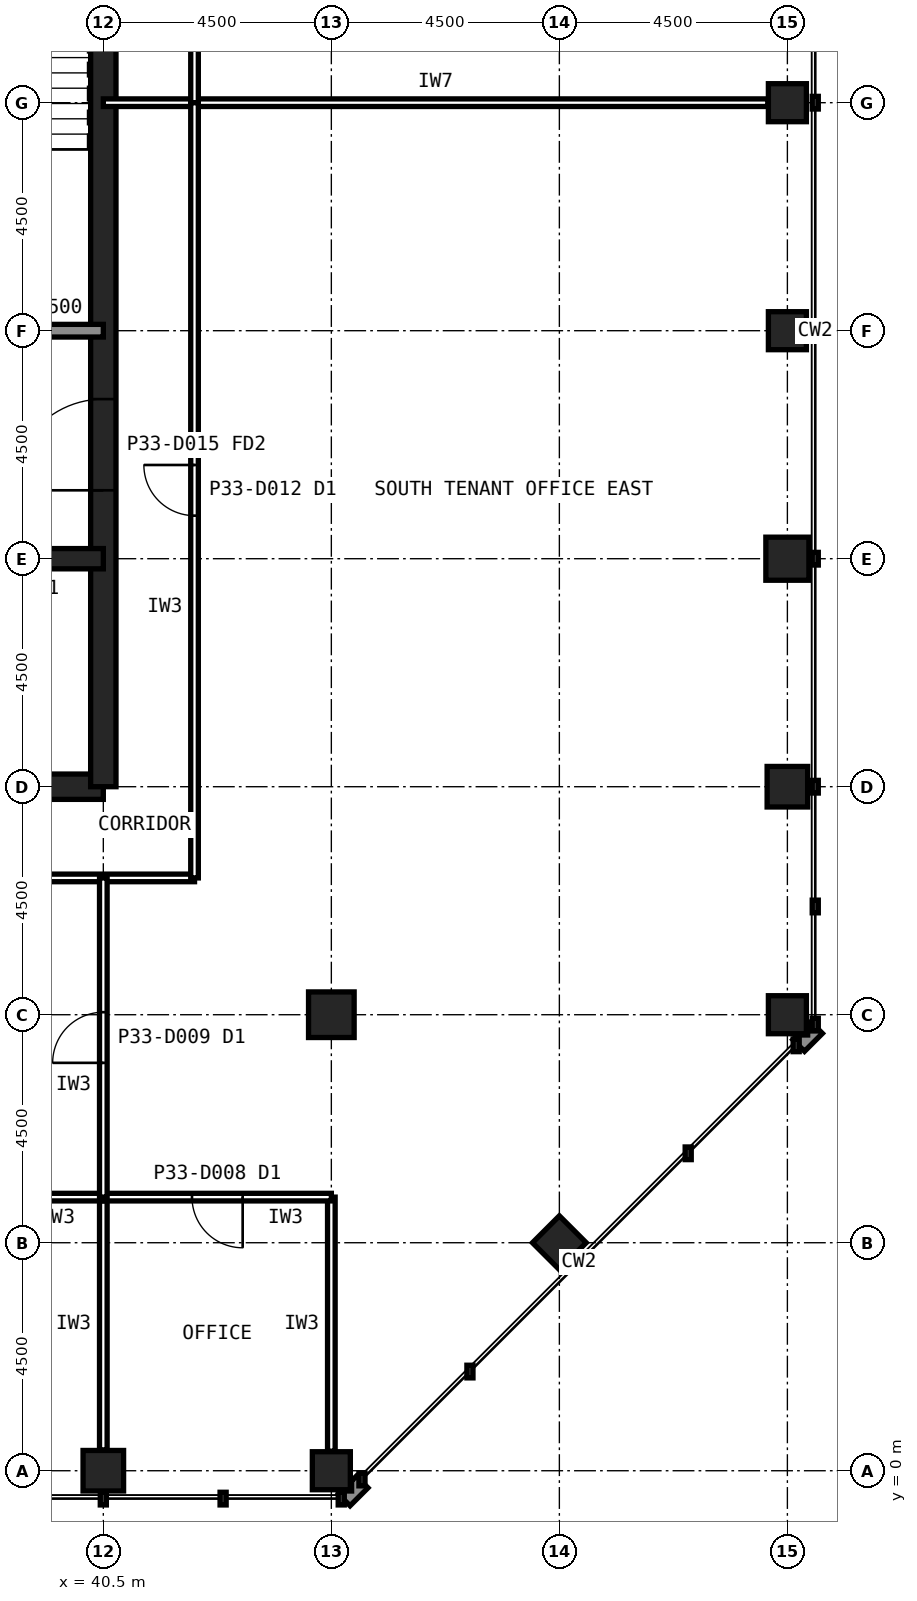
"""IFC4 building model, lengths in metres.
Left out: names, types, materials, properties, quantities, classifications, styles, units other than length and angle.
Written with IfcOpenShell. Run it as: python <this file> out.ifc"""

import sys

from ifc_helpers import new_model, si_unit, direction, frame, frame_2d, origin, origin_2d, place, context, subcontext, project, spatial, rectangle, hollow_rectangle, extrude, element, fill, save


model = new_model("IFC4")
c1 = context("Model", 3, precision=1e-05, world=origin(), true_north=direction((0.0, 1.0)))
c2 = subcontext(c1, "Body", "Model", "MODEL_VIEW")
j1 = project(units=[si_unit("LENGTHUNIT", "METRE"), si_unit("PLANEANGLEUNIT", "RADIAN")], contexts=[c1])
p1 = place(None, origin())
s1 = spatial("IfcSite", under=j1, at=p1, CompositionType="ELEMENT")
p2 = place(p1, origin())
s2 = spatial("IfcBuilding", under=s1, at=p2, CompositionType="ELEMENT")
p3 = place(p2, frame((0.0, 0.0, 143.6)))
s3 = spatial("IfcBuildingStorey", under=s2, at=p3, CompositionType="ELEMENT", Elevation=143.6)
p4 = place(p3, frame((40.5, 0.0, 0.0), z_axis=(0.0, 0.0, 1.0), x_axis=(1.0, 0.0, 0.0)))
e1 = element("IfcColumn", 1, at=p4, inside=s3, PredefinedType="COLUMN", context=c2, shape_type="SweptSolid", body=[
    extrude(hollow_rectangle(XDim=0.8, YDim=0.8, WallThickness=0.045, at=origin_2d()), origin(), (0.0, 0.0, 1.0), 4.0),
])
for number, where, z_axis, x_axis in (
    (2, (45.0, 0.0, 0.0), (0.0, 0.0, 1.0), (1.0, 0.0, 0.0)),
    (3, (54.0, 9.0, 0.0), (0.0, 0.0, 1.0), (1.0, 0.0, 0.0)),
):
    element("IfcColumn", number, at=place(p3, frame(where, z_axis=z_axis, x_axis=x_axis)), inside=s3, PredefinedType="COLUMN", context=c2, shape_type="SweptSolid", body=[
        extrude(hollow_rectangle(XDim=0.75, YDim=0.75, WallThickness=0.04, at=origin_2d()), origin(), (0.0, 0.0, 1.0), 4.0),
    ])
p5 = place(p3, frame((54.0, 13.5, 0.0), z_axis=(0.0, 0.0, 1.0), x_axis=(1.0, 0.0, 0.0)))
e4 = element("IfcColumn", 4, at=p5, inside=s3, PredefinedType="COLUMN", context=c2, shape_type="SweptSolid", body=[
    extrude(hollow_rectangle(XDim=0.8, YDim=0.8, WallThickness=0.045, at=origin_2d()), origin(), (0.0, 0.0, 1.0), 4.0),
])
p6 = place(p3, frame((54.0, 18.0, 0.0), z_axis=(0.0, 0.0, 1.0), x_axis=(1.0, 0.0, 0.0)))
e5 = element("IfcColumn", 5, at=p6, inside=s3, PredefinedType="COLUMN", context=c2, shape_type="SweptSolid", body=[
    extrude(hollow_rectangle(XDim=0.85, YDim=0.85, WallThickness=0.05, at=origin_2d()), origin(), (0.0, 0.0, 1.0), 4.0),
])
for number, where, z_axis, x_axis in (
    (6, (54.0, 22.5, 0.0), (0.0, 0.0, 1.0), (1.0, 0.0, 0.0)),
    (7, (54.0, 27.0, 0.0), (0.0, 0.0, 1.0), (1.0, 0.0, 0.0)),
    (8, (49.5, 4.5, 0.0), (0.0, 0.0, 1.0), (0.707, 0.707, 0.0)),
):
    element("IfcColumn", number, at=place(p3, frame(where, z_axis=z_axis, x_axis=x_axis)), inside=s3, PredefinedType="COLUMN", context=c2, shape_type="SweptSolid", body=[
        extrude(hollow_rectangle(XDim=0.75, YDim=0.75, WallThickness=0.04, at=origin_2d()), origin(), (0.0, 0.0, 1.0), 4.0),
    ])
p7 = place(p3, frame((45.0, 9.0, 0.0), z_axis=(0.0, 0.0, 1.0), x_axis=(1.0, 0.0, 0.0)))
e9 = element("IfcColumn", 9, at=p7, inside=s3, PredefinedType="COLUMN", context=c2, shape_type="SweptSolid", body=[
    extrude(hollow_rectangle(XDim=0.9, YDim=0.9, WallThickness=0.063, at=origin_2d()), origin(), (0.0, 0.0, 1.0), 4.0),
])
p8 = place(p3, frame((13.5, 13.5, 0.0), z_axis=(0.0, 0.0, 1.0), x_axis=(1.0, 0.0, 0.0)))
e10 = element("IfcWall", 10, at=p8, inside=s3, PredefinedType="SHEAR", context=c2, shape_type="SweptSolid", body=[
    extrude(rectangle(XDim=27.0, YDim=0.5, at=frame_2d((13.5, 0.0))), origin(), (0.0, 0.0, 1.0), 4.0),
])
p9 = place(p3, frame((40.5, 13.5, 0.0), z_axis=(0.0, 0.0, 1.0), x_axis=(0.0, 1.0, 0.0)))
e11 = element("IfcWall", 11, at=p9, inside=s3, PredefinedType="SHEAR", context=c2, shape_type="SweptSolid", body=[
    extrude(rectangle(XDim=27.0, YDim=0.5, at=frame_2d((13.5, 0.0))), origin(), (0.0, 0.0, 1.0), 4.0),
])
p10 = place(p9, frame((5.85, 0.0, 0.0)))
e12 = element("IfcOpeningElement", 12, at=p10, cuts=e11, PredefinedType="OPENING", context=c2, shape_type="SweptSolid", body=[
    extrude(rectangle(XDim=1.8, YDim=2.1, at=frame_2d((0.9, 1.05))), frame((0.0, 0.26, 0.0), z_axis=(0.0, -1.0, 0.0), x_axis=(1.0, 0.0, 0.0)), (0.0, 0.0, 1.0), 0.52),
])
p11 = place(p9, frame((19.65, 0.0, 0.0)))
e13 = element("IfcOpeningElement", 13, at=p11, cuts=e11, PredefinedType="OPENING", context=c2, shape_type="SweptSolid", body=[
    extrude(rectangle(XDim=1.2, YDim=2.1, at=frame_2d((0.6, 1.05))), frame((0.0, 0.26, 0.0), z_axis=(0.0, -1.0, 0.0), x_axis=(1.0, 0.0, 0.0)), (0.0, 0.0, 1.0), 0.52),
])
p12 = place(p3, frame((13.5, 18.0, 0.0), z_axis=(0.0, 0.0, 1.0), x_axis=(1.0, 0.0, 0.0)))
e14 = element("IfcWall", 14, at=p12, inside=s3, PredefinedType="SHEAR", context=c2, shape_type="SweptSolid", body=[
    extrude(rectangle(XDim=27.0, YDim=0.4, at=frame_2d((13.5, 0.0))), origin(), (0.0, 0.0, 1.0), 4.0),
])
p13 = place(p12, frame((24.3, 0.0, 0.0)))
e15 = element("IfcOpeningElement", 15, at=p13, cuts=e14, PredefinedType="OPENING", context=c2, shape_type="SweptSolid", body=[
    extrude(rectangle(XDim=0.9, YDim=2.1, at=frame_2d((0.45, 1.05))), frame((0.0, 0.21, 0.0), z_axis=(0.0, -1.0, 0.0), x_axis=(1.0, 0.0, 0.0)), (0.0, 0.0, 1.0), 0.42),
])
p14 = place(p12, frame((5.45, 0.0, 0.0)))
e16 = element("IfcOpeningElement", 16, at=p14, cuts=e14, PredefinedType="OPENING", context=c2, shape_type="SweptSolid", body=[
    extrude(rectangle(XDim=1.1, YDim=2.1, at=frame_2d((0.55, 1.05))), frame((0.0, 0.21, 0.0), z_axis=(0.0, -1.0, 0.0), x_axis=(1.0, 0.0, 0.0)), (0.0, 0.0, 1.0), 0.42),
])
p15 = place(p12, frame((8.45, 0.0, 0.0)))
e17 = element("IfcOpeningElement", 17, at=p15, cuts=e14, PredefinedType="OPENING", context=c2, shape_type="SweptSolid", body=[
    extrude(rectangle(XDim=1.1, YDim=2.1, at=frame_2d((0.55, 1.05))), frame((0.0, 0.21, 0.0), z_axis=(0.0, -1.0, 0.0), x_axis=(1.0, 0.0, 0.0)), (0.0, 0.0, 1.0), 0.42),
])
p16 = place(p12, frame((11.45, 0.0, 0.0)))
e18 = element("IfcOpeningElement", 18, at=p16, cuts=e14, PredefinedType="OPENING", context=c2, shape_type="SweptSolid", body=[
    extrude(rectangle(XDim=1.1, YDim=2.1, at=frame_2d((0.55, 1.05))), frame((0.0, 0.21, 0.0), z_axis=(0.0, -1.0, 0.0), x_axis=(1.0, 0.0, 0.0)), (0.0, 0.0, 1.0), 0.42),
])
p17 = place(p12, frame((14.45, 0.0, 0.0)))
e19 = element("IfcOpeningElement", 19, at=p17, cuts=e14, PredefinedType="OPENING", context=c2, shape_type="SweptSolid", body=[
    extrude(rectangle(XDim=1.1, YDim=2.1, at=frame_2d((0.55, 1.05))), frame((0.0, 0.21, 0.0), z_axis=(0.0, -1.0, 0.0), x_axis=(1.0, 0.0, 0.0)), (0.0, 0.0, 1.0), 0.42),
])
p18 = place(p12, frame((17.45, 0.0, 0.0)))
e20 = element("IfcOpeningElement", 20, at=p18, cuts=e14, PredefinedType="OPENING", context=c2, shape_type="SweptSolid", body=[
    extrude(rectangle(XDim=1.1, YDim=2.1, at=frame_2d((0.55, 1.05))), frame((0.0, 0.21, 0.0), z_axis=(0.0, -1.0, 0.0), x_axis=(1.0, 0.0, 0.0)), (0.0, 0.0, 1.0), 0.42),
])
p19 = place(p12, frame((20.45, 0.0, 0.0)))
e21 = element("IfcOpeningElement", 21, at=p19, cuts=e14, PredefinedType="OPENING", context=c2, shape_type="SweptSolid", body=[
    extrude(rectangle(XDim=1.1, YDim=2.1, at=frame_2d((0.55, 1.05))), frame((0.0, 0.21, 0.0), z_axis=(0.0, -1.0, 0.0), x_axis=(1.0, 0.0, 0.0)), (0.0, 0.0, 1.0), 0.42),
])
p20 = place(p12, frame((1.6, 0.0, 0.0)))
e22 = element("IfcOpeningElement", 22, at=p20, cuts=e14, PredefinedType="OPENING", context=c2, shape_type="SweptSolid", body=[
    extrude(rectangle(XDim=1.3, YDim=2.2, at=frame_2d((0.65, 1.1))), frame((0.0, 0.21, 0.0), z_axis=(0.0, -1.0, 0.0), x_axis=(1.0, 0.0, 0.0)), (0.0, 0.0, 1.0), 0.42),
])
p21 = place(p3, frame((13.5, 22.5, 0.0), z_axis=(0.0, 0.0, 1.0), x_axis=(1.0, 0.0, 0.0)))
e23 = element("IfcWall", 23, at=p21, inside=s3, PredefinedType="SOLIDWALL", context=c2, shape_type="SweptSolid", body=[
    extrude(rectangle(XDim=27.0, YDim=0.25, at=frame_2d((13.5, 0.0))), origin(), (0.0, 0.0, 1.0), 3.84),
])
p22 = place(p21, frame((1.65, 0.0, 0.0)))
e24 = element("IfcOpeningElement", 24, at=p22, cuts=e23, PredefinedType="OPENING", context=c2, shape_type="SweptSolid", body=[
    extrude(rectangle(XDim=1.2, YDim=2.1, at=frame_2d((0.6, 1.05))), frame((0.0, 0.135, 0.0), z_axis=(0.0, -1.0, 0.0), x_axis=(1.0, 0.0, 0.0)), (0.0, 0.0, 1.0), 0.27),
])
p23 = place(p21, frame((6.025, 0.0, 0.0)))
e25 = element("IfcOpeningElement", 25, at=p23, cuts=e23, PredefinedType="OPENING", context=c2, shape_type="SweptSolid", body=[
    extrude(rectangle(XDim=1.0, YDim=2.1, at=frame_2d((0.5, 1.05))), frame((0.0, 0.135, 0.0), z_axis=(0.0, -1.0, 0.0), x_axis=(1.0, 0.0, 0.0)), (0.0, 0.0, 1.0), 0.27),
])
p24 = place(p21, frame((10.525, 0.0, 0.0)))
e26 = element("IfcOpeningElement", 26, at=p24, cuts=e23, PredefinedType="OPENING", context=c2, shape_type="SweptSolid", body=[
    extrude(rectangle(XDim=1.0, YDim=2.1, at=frame_2d((0.5, 1.05))), frame((0.0, 0.135, 0.0), z_axis=(0.0, -1.0, 0.0), x_axis=(1.0, 0.0, 0.0)), (0.0, 0.0, 1.0), 0.27),
])
p25 = place(p21, frame((19.75, 0.0, 0.0)))
e27 = element("IfcOpeningElement", 27, at=p25, cuts=e23, PredefinedType="OPENING", context=c2, shape_type="SweptSolid", body=[
    extrude(rectangle(XDim=1.0, YDim=2.1, at=frame_2d((0.5, 1.05))), frame((0.0, 0.135, 0.0), z_axis=(0.0, -1.0, 0.0), x_axis=(1.0, 0.0, 0.0)), (0.0, 0.0, 1.0), 0.27),
])
p26 = place(p21, frame((15.05, 0.0, 0.0)))
e28 = element("IfcOpeningElement", 28, at=p26, cuts=e23, PredefinedType="OPENING", context=c2, shape_type="SweptSolid", body=[
    extrude(rectangle(XDim=1.4, YDim=2.4, at=frame_2d((0.7, 1.2))), frame((0.0, 0.135, 0.0), z_axis=(0.0, -1.0, 0.0), x_axis=(1.0, 0.0, 0.0)), (0.0, 0.0, 1.0), 0.27),
])
p27 = place(p3, frame((40.5, 27.0, 0.0), z_axis=(0.0, 0.0, 1.0), x_axis=(1.0, 0.0, 0.0)))
e29 = element("IfcWall", 29, at=p27, inside=s3, PredefinedType="PARTITIONING", context=c2, shape_type="SweptSolid", body=[
    extrude(rectangle(XDim=13.115, YDim=0.15, at=frame_2d((6.558, 0.0))), origin(), (0.0, 0.0, 1.0), 2.989),
])
p28 = place(p3, frame((42.3, 27.0, 0.0), z_axis=(0.0, 0.0, 1.0), x_axis=(0.0, 1.0, 0.0)))
e30 = element("IfcWall", 30, at=p28, inside=s3, PredefinedType="PARTITIONING", context=c2, shape_type="SweptSolid", body=[
    extrude(rectangle(XDim=15.3, YDim=0.15, at=frame_2d((7.65, 0.0))), origin(), (0.0, 0.0, 1.0), 3.84),
])
p29 = place(p28, frame((7.15, 0.0, 0.0)))
e31 = element("IfcOpeningElement", 31, at=p29, cuts=e30, PredefinedType="OPENING", context=c2, shape_type="SweptSolid", body=[
    extrude(rectangle(XDim=1.0, YDim=2.1, at=frame_2d((0.5, 1.05))), frame((0.0, 0.085, 0.0), z_axis=(0.0, -1.0, 0.0), x_axis=(1.0, 0.0, 0.0)), (0.0, 0.0, 1.0), 0.17),
])
p30 = place(p3, frame((11.7, 11.7, 0.0), z_axis=(0.0, 0.0, 1.0), x_axis=(1.0, 0.0, 0.0)))
e32 = element("IfcWall", 32, at=p30, inside=s3, PredefinedType="PARTITIONING", context=c2, shape_type="SweptSolid", body=[
    extrude(rectangle(XDim=30.6, YDim=0.15, at=frame_2d((15.3, 0.0))), origin(), (0.0, 0.0, 1.0), 3.84),
])
p31 = place(p30, frame((13.75, 0.0, 0.0)))
e33 = element("IfcOpeningElement", 33, at=p31, cuts=e32, PredefinedType="OPENING", context=c2, shape_type="SweptSolid", body=[
    extrude(rectangle(XDim=1.0, YDim=2.1, at=frame_2d((0.5, 1.05))), frame((0.0, 0.085, 0.0), z_axis=(0.0, -1.0, 0.0), x_axis=(1.0, 0.0, 0.0)), (0.0, 0.0, 1.0), 0.17),
])
p32 = place(p3, frame((42.3, 11.7, 0.0), z_axis=(0.0, 0.0, 1.0), x_axis=(0.0, 1.0, 0.0)))
e34 = element("IfcWall", 34, at=p32, inside=s3, PredefinedType="PARTITIONING", context=c2, shape_type="SweptSolid", body=[
    extrude(rectangle(XDim=15.3, YDim=0.15, at=frame_2d((7.65, 0.0))), origin(), (0.0, 0.0, 1.0), 3.84),
])
p33 = place(p32, frame((7.15, 0.0, 0.0)))
e35 = element("IfcOpeningElement", 35, at=p33, cuts=e34, PredefinedType="OPENING", context=c2, shape_type="SweptSolid", body=[
    extrude(rectangle(XDim=1.0, YDim=2.1, at=frame_2d((0.5, 1.05))), frame((0.0, 0.085, 0.0), z_axis=(0.0, -1.0, 0.0), x_axis=(1.0, 0.0, 0.0)), (0.0, 0.0, 1.0), 0.17),
])
p34 = place(p3, frame((40.5, 0.41, 0.0), z_axis=(0.0, 0.0, 1.0), x_axis=(0.0, 1.0, 0.0)))
e36 = element("IfcWall", 36, at=p34, inside=s3, PredefinedType="PARTITIONING", context=c2, shape_type="SweptSolid", body=[
    extrude(rectangle(XDim=4.99, YDim=0.15, at=frame_2d((2.495, 0.0))), origin(), (0.0, 0.0, 1.0), 2.989),
])
p35 = place(p3, frame((40.5, 5.4, 0.0), z_axis=(0.0, 0.0, 1.0), x_axis=(-1.0, 0.0, 0.0)))
e37 = element("IfcWall", 37, at=p35, inside=s3, PredefinedType="PARTITIONING", context=c2, shape_type="SweptSolid", body=[
    extrude(rectangle(XDim=4.5, YDim=0.15, at=frame_2d((2.25, 0.0))), origin(), (0.0, 0.0, 1.0), 3.84),
])
p36 = place(p35, frame((1.75, 0.0, 0.0)))
e38 = element("IfcOpeningElement", 38, at=p36, cuts=e37, PredefinedType="OPENING", context=c2, shape_type="SweptSolid", body=[
    extrude(rectangle(XDim=1.0, YDim=2.1, at=frame_2d((0.5, 1.05))), frame((0.0, 0.085, 0.0), z_axis=(0.0, -1.0, 0.0), x_axis=(1.0, 0.0, 0.0)), (0.0, 0.0, 1.0), 0.17),
])
p37 = place(p3, frame((45.0, 0.385, 0.0), z_axis=(0.0, 0.0, 1.0), x_axis=(0.0, 1.0, 0.0)))
e39 = element("IfcWall", 39, at=p37, inside=s3, PredefinedType="PARTITIONING", context=c2, shape_type="SweptSolid", body=[
    extrude(rectangle(XDim=5.015, YDim=0.15, at=frame_2d((2.507, 0.0))), origin(), (0.0, 0.0, 1.0), 3.229),
])
p38 = place(p3, frame((45.0, 5.4, 0.0), z_axis=(0.0, 0.0, 1.0), x_axis=(-1.0, 0.0, 0.0)))
e40 = element("IfcWall", 40, at=p38, inside=s3, PredefinedType="PARTITIONING", context=c2, shape_type="SweptSolid", body=[
    extrude(rectangle(XDim=4.5, YDim=0.15, at=frame_2d((2.25, 0.0))), origin(), (0.0, 0.0, 1.0), 3.84),
])
p39 = place(p38, frame((1.75, 0.0, 0.0)))
e41 = element("IfcOpeningElement", 41, at=p39, cuts=e40, PredefinedType="OPENING", context=c2, shape_type="SweptSolid", body=[
    extrude(rectangle(XDim=1.0, YDim=2.1, at=frame_2d((0.5, 1.05))), frame((0.0, 0.085, 0.0), z_axis=(0.0, -1.0, 0.0), x_axis=(1.0, 0.0, 0.0)), (0.0, 0.0, 1.0), 0.17),
])
p40 = place(p3, frame((40.5, 5.4, 0.0), z_axis=(0.0, 0.0, 1.0), x_axis=(0.0, 1.0, 0.0)))
e42 = element("IfcWall", 42, at=p40, inside=s3, PredefinedType="PARTITIONING", context=c2, shape_type="SweptSolid", body=[
    extrude(rectangle(XDim=6.3, YDim=0.15, at=frame_2d((3.15, 0.0))), origin(), (0.0, 0.0, 1.0), 2.989),
])
p41 = place(p40, frame((2.65, 0.0, 0.0)))
e43 = element("IfcOpeningElement", 43, at=p41, cuts=e42, PredefinedType="OPENING", context=c2, shape_type="SweptSolid", body=[
    extrude(rectangle(XDim=1.0, YDim=2.1, at=frame_2d((0.5, 1.05))), frame((0.0, 0.085, 0.0), z_axis=(0.0, -1.0, 0.0), x_axis=(1.0, 0.0, 0.0)), (0.0, 0.0, 1.0), 0.17),
])
p42 = place(p10, origin())
e44 = element("IfcDoor", 44, at=p42, inside=s3, OperationType="SINGLE_SWING_LEFT", PredefinedType="DOOR", context=c2, shape_type="SweptSolid", body=[
    extrude(rectangle(XDim=1.8, YDim=2.1, at=frame_2d((0.9, 1.05))), frame((0.0, 0.025, 0.0), z_axis=(0.0, -1.0, 0.0), x_axis=(1.0, 0.0, 0.0)), (0.0, 0.0, 1.0), 0.05),
])
fill(e12, e44)
p43 = place(p33, origin())
e45 = element("IfcDoor", 45, at=p43, inside=s3, OperationType="SINGLE_SWING_RIGHT", PredefinedType="DOOR", context=c2, shape_type="SweptSolid", body=[
    extrude(rectangle(XDim=1.0, YDim=2.1, at=frame_2d((0.5, 1.05))), frame((0.0, 0.025, 0.0), z_axis=(0.0, -1.0, 0.0), x_axis=(1.0, 0.0, 0.0)), (0.0, 0.0, 1.0), 0.05),
])
fill(e35, e45)
p44 = place(p39, origin())
e46 = element("IfcDoor", 46, at=p44, inside=s3, OperationType="SINGLE_SWING_LEFT", PredefinedType="DOOR", context=c2, shape_type="SweptSolid", body=[
    extrude(rectangle(XDim=1.0, YDim=2.1, at=frame_2d((0.5, 1.05))), frame((0.0, 0.025, 0.0), z_axis=(0.0, -1.0, 0.0), x_axis=(1.0, 0.0, 0.0)), (0.0, 0.0, 1.0), 0.05),
])
fill(e41, e46)
p45 = place(p41, origin())
e47 = element("IfcDoor", 47, at=p45, inside=s3, OperationType="SINGLE_SWING_LEFT", PredefinedType="DOOR", context=c2, shape_type="SweptSolid", body=[
    extrude(rectangle(XDim=1.0, YDim=2.1, at=frame_2d((0.5, 1.05))), frame((0.0, 0.025, 0.0), z_axis=(0.0, -1.0, 0.0), x_axis=(1.0, 0.0, 0.0)), (0.0, 0.0, 1.0), 0.05),
])
fill(e43, e47)
save(model, sys.argv[1])
